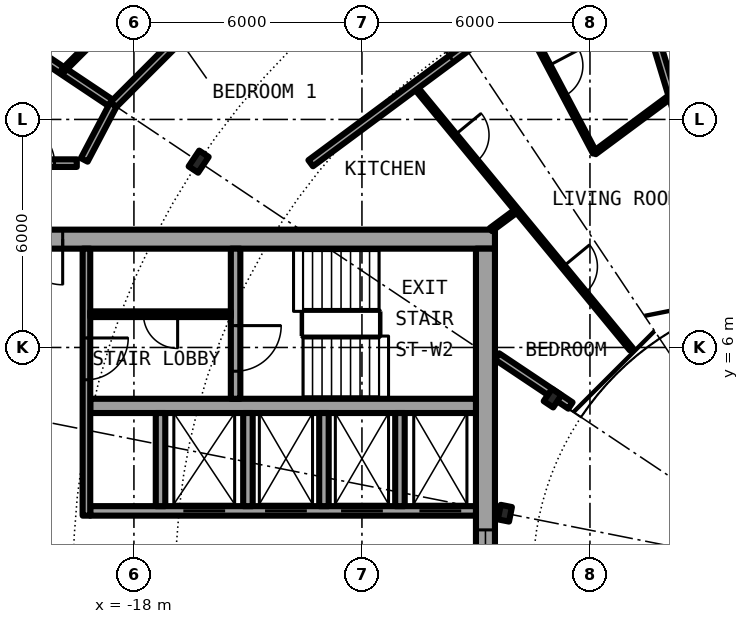
"""IFC4 building model, lengths in metres.
Left out: names, types, materials, properties, quantities, classifications, styles, units other than length and angle.
Written with IfcOpenShell. Run it as: python <this file> out.ifc"""

import sys

from ifc_helpers import new_model, si_unit, direction, frame, frame_2d, origin, origin_2d, place, context, subcontext, project, spatial, rectangle, i_section, extrude, element, fill, save


model = new_model("IFC4")
c1 = context("Model", 3, precision=1e-05, world=origin(), true_north=direction((0.0, 1.0)))
c2 = subcontext(c1, "Body", "Model", "MODEL_VIEW")
j1 = project(units=[si_unit("LENGTHUNIT", "METRE"), si_unit("PLANEANGLEUNIT", "RADIAN")], contexts=[c1])
p1 = place(None, origin())
s1 = spatial("IfcSite", under=j1, at=p1, CompositionType="ELEMENT")
p2 = place(p1, origin())
s2 = spatial("IfcBuilding", under=s1, at=p2, CompositionType="ELEMENT")
p3 = place(p2, frame((0.0, 0.0, 167.7)))
s3 = spatial("IfcBuildingStorey", under=s2, at=p3, CompositionType="ELEMENT", Elevation=167.7)
p4 = place(p3, frame((-16.297, 10.889, 0.0), z_axis=(0.0, 0.0, 1.0), x_axis=(-0.831469612303, 0.55557023302, 0.0)))
e1 = element("IfcColumn", 1, at=p4, inside=s3, PredefinedType="COLUMN", context=c2, shape_type="SweptSolid", body=[
    extrude(i_section(OverallWidth=0.3, OverallDepth=0.5, WebThickness=0.014, FlangeThickness=0.028, FilletRadius=0.027, at=origin_2d()), origin(), (0.0, 0.0, 1.0), 3.05),
])
for number, where, z_axis, x_axis in (
    (2, (-6.984, 4.667, 0.0), (0.0, 0.0, 1.0), (-0.831, 0.556, 0.0)),
    (3, (-8.239, 1.639, 0.0), (0.0, 0.0, 1.0), (-0.981, 0.195, 0.0)),
):
    element("IfcColumn", number, at=place(p3, frame(where, z_axis=z_axis, x_axis=x_axis)), inside=s3, PredefinedType="COLUMN", context=c2, shape_type="SweptSolid", body=[
        extrude(i_section(OverallWidth=0.3, OverallDepth=0.39, WebThickness=0.011, FlangeThickness=0.019, FilletRadius=0.027, at=origin_2d()), origin(), (0.0, 0.0, 1.0), 3.05),
    ])
p5 = place(p3, frame((-8.5, 8.85, 0.0), z_axis=(0.0, 0.0, 1.0), x_axis=(-1.0, 0.0, 0.0)))
e4 = element("IfcWall", 4, at=p5, inside=s3, PredefinedType="SHEAR", context=c2, shape_type="SweptSolid", body=[
    extrude(rectangle(XDim=13.6, YDim=0.5, at=frame_2d((6.8, 0.0))), origin(), (0.0, 0.0, 1.0), 3.05),
])
p6 = place(p5, frame((11.375, 0.0, 0.0)))
e5 = element("IfcOpeningElement", 5, at=p6, cuts=e4, PredefinedType="OPENING", context=c2, shape_type="SweptSolid", body=[
    extrude(rectangle(XDim=1.2, YDim=2.3, at=frame_2d((0.6, 1.15))), frame((0.0, 0.26, 0.0), z_axis=(0.0, -1.0, 0.0), x_axis=(1.0, 0.0, 0.0)), (0.0, 0.0, 1.0), 0.52),
])
p7 = place(p3, frame((-8.75, 8.6, 0.0), z_axis=(0.0, 0.0, 1.0), x_axis=(0.0, -1.0, 0.0)))
e6 = element("IfcWall", 6, at=p7, inside=s3, PredefinedType="SHEAR", context=c2, shape_type="SweptSolid", body=[
    extrude(rectangle(XDim=17.2, YDim=0.5, at=frame_2d((8.6, 0.0))), origin(), (0.0, 0.0, 1.0), 3.05),
])
p8 = place(p7, frame((7.4, 0.0, 0.1)))
e7 = element("IfcOpeningElement", 7, at=p8, cuts=e6, PredefinedType="OPENING", context=c2, shape_type="SweptSolid", body=[
    extrude(rectangle(XDim=2.4, YDim=2.2, at=frame_2d((1.2, 1.1))), frame((0.0, 0.26, 0.0), z_axis=(0.0, -1.0, 0.0), x_axis=(1.0, 0.0, 0.0)), (0.0, 0.0, 1.0), 0.52),
])
p9 = place(p3, frame((-9.0, 1.7, 0.0), z_axis=(0.0, 0.0, 1.0), x_axis=(-1.0, 0.0, 0.0)))
e8 = element("IfcWall", 8, at=p9, inside=s3, PredefinedType="SHEAR", context=c2, shape_type="SweptSolid", body=[
    extrude(rectangle(XDim=10.15, YDim=0.25, at=frame_2d((5.075, 0.0))), origin(), (0.0, 0.0, 1.0), 3.05),
])
p10 = place(p9, frame((0.387, 0.0, 0.0)))
e9 = element("IfcOpeningElement", 9, at=p10, cuts=e8, PredefinedType="OPENING", context=c2, shape_type="SweptSolid", body=[
    extrude(rectangle(XDim=1.1, YDim=2.3, at=frame_2d((0.55, 1.15))), frame((0.0, 0.135, 0.0), z_axis=(0.0, -1.0, 0.0), x_axis=(1.0, 0.0, 0.0)), (0.0, 0.0, 1.0), 0.27),
])
p11 = place(p9, frame((2.45, 0.0, 0.0)))
e10 = element("IfcOpeningElement", 10, at=p11, cuts=e8, PredefinedType="OPENING", context=c2, shape_type="SweptSolid", body=[
    extrude(rectangle(XDim=1.1, YDim=2.3, at=frame_2d((0.55, 1.15))), frame((0.0, 0.135, 0.0), z_axis=(0.0, -1.0, 0.0), x_axis=(1.0, 0.0, 0.0)), (0.0, 0.0, 1.0), 0.27),
])
p12 = place(p9, frame((4.45, 0.0, 0.0)))
e11 = element("IfcOpeningElement", 11, at=p12, cuts=e8, PredefinedType="OPENING", context=c2, shape_type="SweptSolid", body=[
    extrude(rectangle(XDim=1.1, YDim=2.3, at=frame_2d((0.55, 1.15))), frame((0.0, 0.135, 0.0), z_axis=(0.0, -1.0, 0.0), x_axis=(1.0, 0.0, 0.0)), (0.0, 0.0, 1.0), 0.27),
])
p13 = place(p9, frame((6.6, 0.0, 0.0)))
e12 = element("IfcOpeningElement", 12, at=p13, cuts=e8, PredefinedType="OPENING", context=c2, shape_type="SweptSolid", body=[
    extrude(rectangle(XDim=1.1, YDim=2.3, at=frame_2d((0.55, 1.15))), frame((0.0, 0.135, 0.0), z_axis=(0.0, -1.0, 0.0), x_axis=(1.0, 0.0, 0.0)), (0.0, 0.0, 1.0), 0.27),
])
p14 = place(p3, frame((-9.0, 4.462, 0.0), z_axis=(0.0, 0.0, 1.0), x_axis=(-1.0, 0.0, 0.0)))
e13 = element("IfcWall", 13, at=p14, inside=s3, PredefinedType="SHEAR", context=c2, shape_type="SweptSolid", body=[
    extrude(rectangle(XDim=10.15, YDim=0.375, at=frame_2d((5.075, 0.0))), origin(), (0.0, 0.0, 1.0), 3.05),
])
p15 = place(p3, frame((-15.325, 8.6, 0.0), z_axis=(0.0, 0.0, 1.0), x_axis=(0.0, -1.0, 0.0)))
e14 = element("IfcWall", 14, at=p15, inside=s3, PredefinedType="SHEAR", context=c2, shape_type="SweptSolid", body=[
    extrude(rectangle(XDim=3.95, YDim=0.25, at=frame_2d((1.975, 0.0))), origin(), (0.0, 0.0, 1.0), 3.05),
])
p16 = place(p15, frame((2.025, 0.0, 0.0)))
e15 = element("IfcOpeningElement", 15, at=p16, cuts=e14, PredefinedType="OPENING", context=c2, shape_type="SweptSolid", body=[
    extrude(rectangle(XDim=1.2, YDim=2.3, at=frame_2d((0.6, 1.15))), frame((0.0, 0.135, 0.0), z_axis=(0.0, -1.0, 0.0), x_axis=(1.0, 0.0, 0.0)), (0.0, 0.0, 1.0), 0.27),
])
for number, where, z_axis, x_axis in (
    (16, (-15.0, 1.825, 0.0), (0.0, 0.0, 1.0), (0.0, 1.0, 0.0)),
    (17, (-17.3, 1.825, 0.0), (0.0, 0.0, 1.0), (0.0, 1.0, 0.0)),
):
    element("IfcWall", number, at=place(p3, frame(where, z_axis=z_axis, x_axis=x_axis)), inside=s3, PredefinedType="SOLIDWALL", context=c2, shape_type="SweptSolid", body=[
        extrude(rectangle(XDim=2.45, YDim=0.25, at=frame_2d((1.225, 0.0))), origin(), (0.0, 0.0, 1.0), 2.7),
    ])
p17 = place(p3, frame((-19.25, 8.6, 0.0), z_axis=(0.0, 0.0, 1.0), x_axis=(0.0, -1.0, 0.0)))
e18 = element("IfcWall", 18, at=p17, inside=s3, PredefinedType="SOLIDWALL", context=c2, shape_type="SweptSolid", body=[
    extrude(rectangle(XDim=7.025, YDim=0.2, at=frame_2d((3.513, 0.0))), origin(), (0.0, 0.0, 1.0), 2.7),
])
p18 = place(p17, frame((2.35, 0.0, 0.0)))
e19 = element("IfcOpeningElement", 19, at=p18, cuts=e18, PredefinedType="OPENING", context=c2, shape_type="SweptSolid", body=[
    extrude(rectangle(XDim=1.1, YDim=2.3, at=frame_2d((0.55, 1.15))), frame((0.0, 0.11, 0.0), z_axis=(0.0, -1.0, 0.0), x_axis=(1.0, 0.0, 0.0)), (0.0, 0.0, 1.0), 0.22),
])
for number, where, z_axis, x_axis in (
    (20, (-11.0, 1.825, 0.0), (0.0, 0.0, 1.0), (0.0, 1.0, 0.0)),
    (21, (-13.0, 1.825, 0.0), (0.0, 0.0, 1.0), (0.0, 1.0, 0.0)),
):
    element("IfcWall", number, at=place(p3, frame(where, z_axis=z_axis, x_axis=x_axis)), inside=s3, PredefinedType="SOLIDWALL", context=c2, shape_type="SweptSolid", body=[
        extrude(rectangle(XDim=2.45, YDim=0.25, at=frame_2d((1.225, 0.0))), origin(), (0.0, 0.0, 1.0), 2.7),
    ])
p19 = place(p3, frame((-15.45, 6.875, 0.0), z_axis=(0.0, 0.0, 1.0), x_axis=(-1.0, 0.0, 0.0)))
e22 = element("IfcWall", 22, at=p19, inside=s3, PredefinedType="PARTITIONING", context=c2, shape_type="SweptSolid", body=[
    extrude(rectangle(XDim=3.7, YDim=0.15, at=frame_2d((1.85, 0.0))), origin(), (0.0, 0.0, 1.0), 2.7),
])
p20 = place(p19, frame((1.4, 0.0, 0.0)))
e23 = element("IfcOpeningElement", 23, at=p20, cuts=e22, PredefinedType="OPENING", context=c2, shape_type="SweptSolid", body=[
    extrude(rectangle(XDim=0.9, YDim=2.3, at=frame_2d((0.45, 1.15))), frame((0.0, 0.085, 0.0), z_axis=(0.0, -1.0, 0.0), x_axis=(1.0, 0.0, 0.0)), (0.0, 0.0, 1.0), 0.17),
])
p21 = place(p3, frame((-22.595, 15.098, 0.0), z_axis=(0.0, 0.0, 1.0), x_axis=(0.831387096605, -0.55569370664, 0.0)))
e24 = element("IfcWall", 24, at=p21, inside=s3, PredefinedType="PARTITIONING", context=c2, shape_type="SweptSolid", body=[
    extrude(rectangle(XDim=4.875, YDim=0.2, at=frame_2d((2.438, 0.0))), origin(), (0.0, 0.0, 1.0), 2.7),
])
p22 = place(p3, frame((-10.616, 12.875, 0.0), z_axis=(0.0, 0.0, 1.0), x_axis=(0.636045954217, -0.771651180342, 0.0)))
e25 = element("IfcWall", 25, at=p22, inside=s3, PredefinedType="PARTITIONING", context=c2, shape_type="SweptSolid", body=[
    extrude(rectangle(XDim=8.968, YDim=0.1, at=frame_2d((4.484, 0.0))), origin(), (0.0, 0.0, 1.0), 2.7),
])
p23 = place(p22, frame((1.667, 0.0, 0.0)))
e26 = element("IfcOpeningElement", 26, at=p23, cuts=e25, PredefinedType="OPENING", context=c2, shape_type="SweptSolid", body=[
    extrude(rectangle(XDim=0.9, YDim=2.3, at=frame_2d((0.45, 1.15))), frame((0.0, 0.06, 0.0), z_axis=(0.0, -1.0, 0.0), x_axis=(1.0, 0.0, 0.0)), (0.0, 0.0, 1.0), 0.12),
])
p24 = place(p22, frame((6.151, 0.0, 0.0)))
e27 = element("IfcOpeningElement", 27, at=p24, cuts=e25, PredefinedType="OPENING", context=c2, shape_type="SweptSolid", body=[
    extrude(rectangle(XDim=0.9, YDim=2.3, at=frame_2d((0.45, 1.15))), frame((0.0, 0.06, 0.0), z_axis=(0.0, -1.0, 0.0), x_axis=(1.0, 0.0, 0.0)), (0.0, 0.0, 1.0), 0.12),
])
p25 = place(p3, frame((-7.875, 14.908, 0.0), z_axis=(0.0, 0.0, 1.0), x_axis=(0.467030118529, -0.884241408432, 0.0)))
e28 = element("IfcWall", 28, at=p25, inside=s3, PredefinedType="PARTITIONING", context=c2, shape_type="SweptSolid", body=[
    extrude(rectangle(XDim=4.278, YDim=0.1, at=frame_2d((2.139, 0.0))), origin(), (0.0, 0.0, 1.0), 2.7),
])
p26 = place(p25, frame((1.689, 0.0, 0.0)))
e29 = element("IfcOpeningElement", 29, at=p26, cuts=e28, PredefinedType="OPENING", context=c2, shape_type="SweptSolid", body=[
    extrude(rectangle(XDim=0.9, YDim=2.3, at=frame_2d((0.45, 1.15))), frame((0.0, 0.06, 0.0), z_axis=(0.0, -1.0, 0.0), x_axis=(1.0, 0.0, 0.0)), (0.0, 0.0, 1.0), 0.12),
])
p27 = place(p3, frame((-5.14, 16.937, 0.0), z_axis=(0.0, 0.0, 1.0), x_axis=(0.290401199794, -0.956904981259, 0.0)))
e30 = element("IfcWall", 30, at=p27, inside=s3, PredefinedType="PARTITIONING", context=c2, shape_type="SweptSolid", body=[
    extrude(rectangle(XDim=9.979, YDim=0.2, at=frame_2d((4.99, 0.0))), origin(), (0.0, 0.0, 1.0), 2.7),
])
p28 = place(p3, frame((-6.513, 4.472, 0.0), z_axis=(0.0, 0.0, 1.0), x_axis=(-0.83133816625, 0.555766905579, 0.0)))
e31 = element("IfcWall", 31, at=p28, inside=s3, PredefinedType="PARTITIONING", context=c2, shape_type="SweptSolid", body=[
    extrude(rectangle(XDim=2.323, YDim=0.2, at=frame_2d((1.162, 0.0))), origin(), (0.0, 0.0, 1.0), 2.7),
])
p29 = place(p3, frame((-21.675, 10.85, 0.0), z_axis=(0.0, 0.0, 1.0), x_axis=(1.0, 0.0, 0.0)))
e32 = element("IfcWall", 32, at=p29, inside=s3, PredefinedType="PARTITIONING", context=c2, shape_type="SweptSolid", body=[
    extrude(rectangle(XDim=2.171, YDim=0.2, at=frame_2d((1.085, 0.0))), origin(), (0.0, 0.0, 1.0), 2.7),
])
p30 = place(p29, frame((0.585, 0.0, 0.0)))
e33 = element("IfcOpeningElement", 33, at=p30, cuts=e32, PredefinedType="OPENING", context=c2, shape_type="SweptSolid", body=[
    extrude(rectangle(XDim=1.0, YDim=2.3, at=frame_2d((0.5, 1.15))), frame((0.0, 0.11, 0.0), z_axis=(0.0, -1.0, 0.0), x_axis=(1.0, 0.0, 0.0)), (0.0, 0.0, 1.0), 0.22),
])
p31 = place(p3, frame((-8.607, 9.1, 0.0), z_axis=(0.0, 0.0, 1.0), x_axis=(0.803199066515, 0.595710718007, 0.0)))
e34 = element("IfcWall", 34, at=p31, inside=s3, PredefinedType="PARTITIONING", context=c2, shape_type="SweptSolid", body=[
    extrude(rectangle(XDim=0.858, YDim=0.1, at=frame_2d((0.429, 0.0))), origin(), (0.0, 0.0, 1.0), 2.7),
])
p32 = place(p3, frame((-5.877, 11.125, 0.0), z_axis=(0.0, 0.0, 1.0), x_axis=(0.803259509791, 0.595629213463, 0.0)))
e35 = element("IfcWall", 35, at=p32, inside=s3, PredefinedType="PARTITIONING", context=c2, shape_type="SweptSolid", body=[
    extrude(rectangle(XDim=2.543, YDim=0.1, at=frame_2d((1.272, 0.0))), origin(), (0.0, 0.0, 1.0), 2.7),
])
p33 = place(p3, frame((-13.349, 10.848, 0.0), z_axis=(0.0, 0.0, 1.0), x_axis=(0.803229232922, 0.595670042371, 0.0)))
e36 = element("IfcWall", 36, at=p33, inside=s3, PredefinedType="PARTITIONING", context=c2, shape_type="SweptSolid", body=[
    extrude(rectangle(XDim=10.224, YDim=0.2, at=frame_2d((5.112, 0.0))), origin(), (0.0, 0.0, 1.0), 2.7),
])
p34 = place(p33, frame((4.612, 0.0, 0.0)))
e37 = element("IfcOpeningElement", 37, at=p34, cuts=e36, PredefinedType="OPENING", context=c2, shape_type="SweptSolid", body=[
    extrude(rectangle(XDim=1.0, YDim=2.3, at=frame_2d((0.5, 1.15))), frame((0.0, 0.11, 0.0), z_axis=(0.0, -1.0, 0.0), x_axis=(1.0, 0.0, 0.0)), (0.0, 0.0, 1.0), 0.22),
])
p35 = place(p3, frame((-18.542, 12.389, 0.0), z_axis=(0.0, 0.0, 1.0), x_axis=(0.707106781187, 0.707106781187, 0.0)))
e38 = element("IfcWall", 38, at=p35, inside=s3, PredefinedType="PARTITIONING", context=c2, shape_type="SweptSolid", body=[
    extrude(rectangle(XDim=8.702, YDim=0.2, at=frame_2d((4.351, 0.0))), origin(), (0.0, 0.0, 1.0), 2.7),
])
p36 = place(p35, frame((2.763, 0.0, 0.0)))
e39 = element("IfcOpeningElement", 39, at=p36, cuts=e38, PredefinedType="OPENING", context=c2, shape_type="SweptSolid", body=[
    extrude(rectangle(XDim=1.0, YDim=2.3, at=frame_2d((0.5, 1.15))), frame((0.0, 0.11, 0.0), z_axis=(0.0, -1.0, 0.0), x_axis=(1.0, 0.0, 0.0)), (0.0, 0.0, 1.0), 0.22),
])
p37 = place(p3, frame((-19.307, 10.935, 0.0), z_axis=(0.0, 0.0, 1.0), x_axis=(0.465605550524, 0.884992356646, 0.0)))
e40 = element("IfcWall", 40, at=p37, inside=s3, PredefinedType="PARTITIONING", context=c2, shape_type="SweptSolid", body=[
    extrude(rectangle(XDim=1.643, YDim=0.2, at=frame_2d((0.821, 0.0))), origin(), (0.0, 0.0, 1.0), 2.7),
])
p38 = place(p3, frame((-19.872, 13.278, 0.0), z_axis=(0.0, 0.0, 1.0), x_axis=(0.707132961115, 0.707080600289, 0.0)))
e41 = element("IfcWall", 41, at=p38, inside=s3, PredefinedType="PARTITIONING", context=c2, shape_type="SweptSolid", body=[
    extrude(rectangle(XDim=4.663, YDim=0.1, at=frame_2d((2.331, 0.0))), origin(), (0.0, 0.0, 1.0), 2.7),
])
p39 = place(p38, frame((0.719, 0.0, 0.0)))
e42 = element("IfcOpeningElement", 42, at=p39, cuts=e41, PredefinedType="OPENING", context=c2, shape_type="SweptSolid", body=[
    extrude(rectangle(XDim=0.9, YDim=2.3, at=frame_2d((0.45, 1.15))), frame((0.0, 0.06, 0.0), z_axis=(0.0, -1.0, 0.0), x_axis=(1.0, 0.0, 0.0)), (0.0, 0.0, 1.0), 0.12),
])
p40 = place(p10, origin())
e43 = element("IfcDoor", 43, at=p40, inside=s3, OperationType="DOUBLE_DOOR_SLIDING", PredefinedType="DOOR", context=c2, shape_type="SweptSolid", body=[
    extrude(rectangle(XDim=1.1, YDim=2.3, at=frame_2d((0.55, 1.15))), frame((0.0, 0.025, 0.0), z_axis=(0.0, -1.0, 0.0), x_axis=(1.0, 0.0, 0.0)), (0.0, 0.0, 1.0), 0.05),
])
fill(e9, e43)
p41 = place(p11, origin())
e44 = element("IfcDoor", 44, at=p41, inside=s3, OperationType="DOUBLE_DOOR_SLIDING", PredefinedType="DOOR", context=c2, shape_type="SweptSolid", body=[
    extrude(rectangle(XDim=1.1, YDim=2.3, at=frame_2d((0.55, 1.15))), frame((0.0, 0.025, 0.0), z_axis=(0.0, -1.0, 0.0), x_axis=(1.0, 0.0, 0.0)), (0.0, 0.0, 1.0), 0.05),
])
fill(e10, e44)
p42 = place(p12, origin())
e45 = element("IfcDoor", 45, at=p42, inside=s3, OperationType="DOUBLE_DOOR_SLIDING", PredefinedType="DOOR", context=c2, shape_type="SweptSolid", body=[
    extrude(rectangle(XDim=1.1, YDim=2.3, at=frame_2d((0.55, 1.15))), frame((0.0, 0.025, 0.0), z_axis=(0.0, -1.0, 0.0), x_axis=(1.0, 0.0, 0.0)), (0.0, 0.0, 1.0), 0.05),
])
fill(e11, e45)
p43 = place(p13, origin())
e46 = element("IfcDoor", 46, at=p43, inside=s3, OperationType="DOUBLE_DOOR_SLIDING", PredefinedType="DOOR", context=c2, shape_type="SweptSolid", body=[
    extrude(rectangle(XDim=1.1, YDim=2.3, at=frame_2d((0.55, 1.15))), frame((0.0, 0.025, 0.0), z_axis=(0.0, -1.0, 0.0), x_axis=(1.0, 0.0, 0.0)), (0.0, 0.0, 1.0), 0.05),
])
fill(e12, e46)
p44 = place(p20, origin())
e47 = element("IfcDoor", 47, at=p44, inside=s3, OperationType="SINGLE_SWING_LEFT", PredefinedType="DOOR", context=c2, shape_type="SweptSolid", body=[
    extrude(rectangle(XDim=0.9, YDim=2.3, at=frame_2d((0.45, 1.15))), frame((0.0, 0.025, 0.0), z_axis=(0.0, -1.0, 0.0), x_axis=(1.0, 0.0, 0.0)), (0.0, 0.0, 1.0), 0.05),
])
fill(e23, e47)
p45 = place(p16, origin())
e48 = element("IfcDoor", 48, at=p45, inside=s3, OperationType="SINGLE_SWING_LEFT", PredefinedType="DOOR", context=c2, shape_type="SweptSolid", body=[
    extrude(rectangle(XDim=1.2, YDim=2.3, at=frame_2d((0.6, 1.15))), frame((0.0, 0.025, 0.0), z_axis=(0.0, -1.0, 0.0), x_axis=(1.0, 0.0, 0.0)), (0.0, 0.0, 1.0), 0.05),
])
fill(e15, e48)
p46 = place(p18, origin())
e49 = element("IfcDoor", 49, at=p46, inside=s3, OperationType="SINGLE_SWING_RIGHT", PredefinedType="DOOR", context=c2, shape_type="SweptSolid", body=[
    extrude(rectangle(XDim=1.1, YDim=2.3, at=frame_2d((0.55, 1.15))), frame((0.0, 0.025, 0.0), z_axis=(0.0, -1.0, 0.0), x_axis=(1.0, 0.0, 0.0)), (0.0, 0.0, 1.0), 0.05),
])
fill(e19, e49)
p47 = place(p6, origin())
e50 = element("IfcDoor", 50, at=p47, inside=s3, OperationType="SINGLE_SWING_LEFT", PredefinedType="DOOR", context=c2, shape_type="SweptSolid", body=[
    extrude(rectangle(XDim=1.2, YDim=2.3, at=frame_2d((0.6, 1.15))), frame((0.0, 0.025, 0.0), z_axis=(0.0, -1.0, 0.0), x_axis=(1.0, 0.0, 0.0)), (0.0, 0.0, 1.0), 0.05),
])
fill(e5, e50)
p48 = place(p8, origin())
e51 = element("IfcWindow", 51, at=p48, inside=s3, PartitioningType="SINGLE_PANEL", PredefinedType="WINDOW", context=c2, shape_type="SweptSolid", body=[
    extrude(rectangle(XDim=2.4, YDim=2.2, at=frame_2d((1.2, 1.1))), frame((0.0, 0.03, 0.0), z_axis=(0.0, -1.0, 0.0), x_axis=(1.0, 0.0, 0.0)), (0.0, 0.0, 1.0), 0.06),
])
fill(e7, e51)
p49 = place(p34, origin())
e52 = element("IfcDoor", 52, at=p49, inside=s3, OperationType="SINGLE_SWING_LEFT", PredefinedType="DOOR", context=c2, shape_type="SweptSolid", body=[
    extrude(rectangle(XDim=1.0, YDim=2.3, at=frame_2d((0.5, 1.15))), frame((0.0, 0.025, 0.0), z_axis=(0.0, -1.0, 0.0), x_axis=(1.0, 0.0, 0.0)), (0.0, 0.0, 1.0), 0.05),
])
fill(e37, e52)
p50 = place(p26, origin())
e53 = element("IfcDoor", 53, at=p50, inside=s3, OperationType="SINGLE_SWING_RIGHT", PredefinedType="DOOR", context=c2, shape_type="SweptSolid", body=[
    extrude(rectangle(XDim=0.9, YDim=2.3, at=frame_2d((0.45, 1.15))), frame((0.0, 0.025, 0.0), z_axis=(0.0, -1.0, 0.0), x_axis=(1.0, 0.0, 0.0)), (0.0, 0.0, 1.0), 0.05),
])
fill(e29, e53)
p51 = place(p23, origin())
e54 = element("IfcDoor", 54, at=p51, inside=s3, OperationType="SINGLE_SWING_LEFT", PredefinedType="DOOR", context=c2, shape_type="SweptSolid", body=[
    extrude(rectangle(XDim=0.9, YDim=2.3, at=frame_2d((0.45, 1.15))), frame((0.0, 0.025, 0.0), z_axis=(0.0, -1.0, 0.0), x_axis=(1.0, 0.0, 0.0)), (0.0, 0.0, 1.0), 0.05),
])
fill(e26, e54)
p52 = place(p24, origin())
e55 = element("IfcDoor", 55, at=p52, inside=s3, OperationType="SINGLE_SWING_RIGHT", PredefinedType="DOOR", context=c2, shape_type="SweptSolid", body=[
    extrude(rectangle(XDim=0.9, YDim=2.3, at=frame_2d((0.45, 1.15))), frame((0.0, 0.025, 0.0), z_axis=(0.0, -1.0, 0.0), x_axis=(1.0, 0.0, 0.0)), (0.0, 0.0, 1.0), 0.05),
])
fill(e27, e55)
p53 = place(p30, origin())
e56 = element("IfcDoor", 56, at=p53, inside=s3, OperationType="SINGLE_SWING_LEFT", PredefinedType="DOOR", context=c2, shape_type="SweptSolid", body=[
    extrude(rectangle(XDim=1.0, YDim=2.3, at=frame_2d((0.5, 1.15))), frame((0.0, 0.025, 0.0), z_axis=(0.0, -1.0, 0.0), x_axis=(1.0, 0.0, 0.0)), (0.0, 0.0, 1.0), 0.05),
])
fill(e33, e56)
save(model, sys.argv[1])
